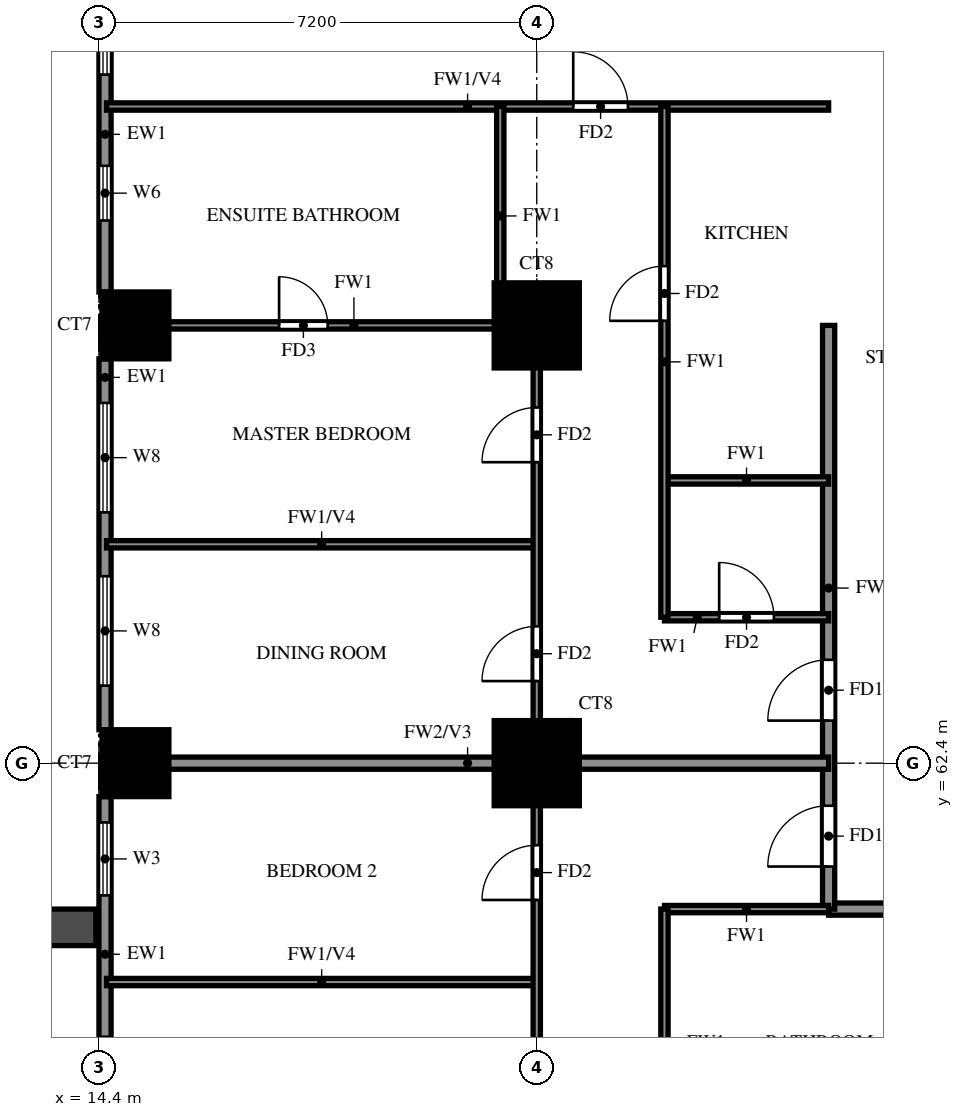
"""IFC4 building model, lengths in metres.
Left out: names, types, materials, properties, quantities, classifications, styles, units other than length and angle.
Written with IfcOpenShell. Run it as: python <this file> out.ifc"""

import sys

from ifc_helpers import new_model, si_unit, direction, frame, frame_2d, origin, origin_2d, place, context, subcontext, project, spatial, rectangle, extrude, source, transform, mapped, element, fill, save


model = new_model("IFC4")
c1 = context("Model", 3, precision=1e-05, world=origin(), true_north=direction((0.0, 1.0)))
c2 = subcontext(c1, "Body", "Model", "MODEL_VIEW")
j1 = project(units=[si_unit("LENGTHUNIT", "METRE"), si_unit("PLANEANGLEUNIT", "RADIAN")], contexts=[c1])
p1 = place(None, origin())
s1 = spatial("IfcSite", under=j1, at=p1, CompositionType="ELEMENT")
p2 = place(p1, origin())
s2 = spatial("IfcBuilding", under=s1, at=p2, CompositionType="ELEMENT")
p3 = place(p2, frame((0.0, 0.0, 30.5)))
s3 = spatial("IfcBuildingStorey", under=s2, at=p3, CompositionType="ELEMENT", Elevation=30.5)
m1 = source(origin(), c2, "Body", "SweptSolid", [
    extrude(rectangle(XDim=1.1, YDim=1.1, at=origin_2d()), origin(), (0.0, 0.0, 1.0), 3.18),
])
p4 = place(p3, frame((15.0, 62.4, 0.0), z_axis=(0.0, 0.0, 1.0), x_axis=(1.0, 0.0, 0.0)))
e1 = element("IfcColumn", 1, at=p4, inside=s3, PredefinedType="COLUMN", context=c2, shape_type="MappedRepresentation", body=[
    mapped(m1, transform((0.0, 0.0, 0.0))),
])
m2 = source(origin(), c2, "Body", "SweptSolid", [
    extrude(rectangle(XDim=1.4, YDim=1.4, at=origin_2d()), origin(), (0.0, 0.0, 1.0), 3.18),
])
p5 = place(p3, frame((21.6, 62.4, 0.0), z_axis=(0.0, 0.0, 1.0), x_axis=(1.0, 0.0, 0.0)))
e2 = element("IfcColumn", 2, at=p5, inside=s3, PredefinedType="COLUMN", context=c2, shape_type="MappedRepresentation", body=[
    mapped(m2, transform((0.0, 0.0, 0.0))),
])
p6 = place(p3, frame((15.0, 69.6, 0.0), z_axis=(0.0, 0.0, 1.0), x_axis=(1.0, 0.0, 0.0)))
e3 = element("IfcColumn", 3, at=p6, inside=s3, PredefinedType="COLUMN", context=c2, shape_type="MappedRepresentation", body=[
    mapped(m1, transform((0.0, 0.0, 0.0))),
])
p7 = place(p3, frame((21.6, 69.6, 0.0), z_axis=(0.0, 0.0, 1.0), x_axis=(1.0, 0.0, 0.0)))
e4 = element("IfcColumn", 4, at=p7, inside=s3, PredefinedType="COLUMN", context=c2, shape_type="MappedRepresentation", body=[
    mapped(m2, transform((0.0, 0.0, 0.0))),
])
p8 = place(p3, frame((14.5, 76.25, 0.0), z_axis=(0.0, 0.0, 1.0), x_axis=(0.0, -1.0, 0.0)))
e5 = element("IfcWall", 5, at=p8, inside=s3, PredefinedType="SOLIDWALL", context=c2, shape_type="SweptSolid", body=[
    extrude(rectangle(XDim=6.1, YDim=0.2, at=frame_2d((3.05, 0.0))), origin(), (0.0, 0.0, 1.0), 3.18),
])
p9 = place(p8, frame((4.025, 0.0, 1.5)))
e6 = element("IfcOpeningElement", 6, at=p9, cuts=e5, PredefinedType="OPENING", context=c2, shape_type="SweptSolid", body=[
    extrude(rectangle(XDim=0.9, YDim=0.9, at=frame_2d((0.45, 0.45))), frame((0.0, 0.11, 0.0), z_axis=(0.0, -1.0, 0.0), x_axis=(1.0, 0.0, 0.0)), (0.0, 0.0, 1.0), 0.22),
])
p10 = place(p8, frame((0.725, 0.0, 0.6)))
e7 = element("IfcOpeningElement", 7, at=p10, cuts=e5, PredefinedType="OPENING", context=c2, shape_type="SweptSolid", body=[
    extrude(rectangle(XDim=1.8, YDim=2.4, at=frame_2d((0.9, 1.2))), frame((0.0, 0.11, 0.0), z_axis=(0.0, -1.0, 0.0), x_axis=(1.0, 0.0, 0.0)), (0.0, 0.0, 1.0), 0.22),
])
p11 = place(p3, frame((14.5, 69.05, 0.0), z_axis=(0.0, 0.0, 1.0), x_axis=(0.0, -1.0, 0.0)))
e8 = element("IfcWall", 8, at=p11, inside=s3, PredefinedType="SOLIDWALL", context=c2, shape_type="SweptSolid", body=[
    extrude(rectangle(XDim=6.1, YDim=0.2, at=frame_2d((3.05, 0.0))), origin(), (0.0, 0.0, 1.0), 3.18),
])
p12 = place(p11, frame((3.575, 0.0, 0.6)))
e9 = element("IfcOpeningElement", 9, at=p12, cuts=e8, PredefinedType="OPENING", context=c2, shape_type="SweptSolid", body=[
    extrude(rectangle(XDim=1.8, YDim=2.4, at=frame_2d((0.9, 1.2))), frame((0.0, 0.11, 0.0), z_axis=(0.0, -1.0, 0.0), x_axis=(1.0, 0.0, 0.0)), (0.0, 0.0, 1.0), 0.22),
])
p13 = place(p11, frame((0.725, 0.0, 0.6)))
e10 = element("IfcOpeningElement", 10, at=p13, cuts=e8, PredefinedType="OPENING", context=c2, shape_type="SweptSolid", body=[
    extrude(rectangle(XDim=1.8, YDim=2.4, at=frame_2d((0.9, 1.2))), frame((0.0, 0.11, 0.0), z_axis=(0.0, -1.0, 0.0), x_axis=(1.0, 0.0, 0.0)), (0.0, 0.0, 1.0), 0.22),
])
p14 = place(p3, frame((14.5, 61.85, 0.0), z_axis=(0.0, 0.0, 1.0), x_axis=(0.0, -1.0, 0.0)))
e11 = element("IfcWall", 11, at=p14, inside=s3, PredefinedType="SOLIDWALL", context=c2, shape_type="SweptSolid", body=[
    extrude(rectangle(XDim=6.1, YDim=0.2, at=frame_2d((3.05, 0.0))), origin(), (0.0, 0.0, 1.0), 3.18),
])
p15 = place(p14, frame((3.95, 0.0, 0.0)))
e12 = element("IfcOpeningElement", 12, at=p15, cuts=e11, PredefinedType="OPENING", context=c2, shape_type="SweptSolid", body=[
    extrude(rectangle(XDim=1.8, YDim=2.4, at=frame_2d((0.9, 1.2))), frame((0.0, 0.11, 0.0), z_axis=(0.0, -1.0, 0.0), x_axis=(1.0, 0.0, 0.0)), (0.0, 0.0, 1.0), 0.22),
])
p16 = place(p14, frame((0.425, 0.0, 0.6)))
e13 = element("IfcOpeningElement", 13, at=p16, cuts=e11, PredefinedType="OPENING", context=c2, shape_type="SweptSolid", body=[
    extrude(rectangle(XDim=1.2, YDim=2.4, at=frame_2d((0.6, 1.2))), frame((0.0, 0.11, 0.0), z_axis=(0.0, -1.0, 0.0), x_axis=(1.0, 0.0, 0.0)), (0.0, 0.0, 1.0), 0.22),
])
p17 = place(p3, frame((14.35, 59.7, 0.0), z_axis=(0.0, 0.0, 1.0), x_axis=(-1.0, 0.0, 0.0)))
e14 = element("IfcWall", 14, at=p17, inside=s3, PredefinedType="SOLIDWALL", context=c2, shape_type="SweptSolid", body=[
    extrude(rectangle(XDim=2.65, YDim=0.6, at=frame_2d((1.325, 0.0))), origin(), (0.0, 0.0, 1.0), 2.85),
])
p18 = place(p3, frame((26.4, 60.0, 0.0), z_axis=(0.0, 0.0, 1.0), x_axis=(1.0, 0.0, 0.0)))
e15 = element("IfcWall", 15, at=p18, inside=s3, PredefinedType="SOLIDWALL", context=c2, shape_type="SweptSolid", body=[
    extrude(rectangle(XDim=7.2, YDim=0.2, at=frame_2d((3.6, 0.0))), origin(), (0.0, 0.0, 1.0), 3.18),
])
p19 = place(p3, frame((26.4, 60.0, 0.0), z_axis=(0.0, 0.0, 1.0), x_axis=(0.0, 1.0, 0.0)))
e16 = element("IfcWall", 16, at=p19, inside=s3, PredefinedType="SOLIDWALL", context=c2, shape_type="SweptSolid", body=[
    extrude(rectangle(XDim=9.6, YDim=0.2, at=frame_2d((4.8, 0.0))), origin(), (0.0, 0.0, 1.0), 3.18),
])
p20 = place(p19, frame((0.7, 0.0, 0.0)))
e17 = element("IfcOpeningElement", 17, at=p20, cuts=e16, PredefinedType="OPENING", context=c2, shape_type="SweptSolid", body=[
    extrude(rectangle(XDim=1.0, YDim=2.1, at=frame_2d((0.5, 1.05))), frame((0.0, 0.11, 0.0), z_axis=(0.0, -1.0, 0.0), x_axis=(1.0, 0.0, 0.0)), (0.0, 0.0, 1.0), 0.22),
])
p21 = place(p19, frame((3.1, 0.0, 0.0)))
e18 = element("IfcOpeningElement", 18, at=p21, cuts=e16, PredefinedType="OPENING", context=c2, shape_type="SweptSolid", body=[
    extrude(rectangle(XDim=1.0, YDim=2.1, at=frame_2d((0.5, 1.05))), frame((0.0, 0.11, 0.0), z_axis=(0.0, -1.0, 0.0), x_axis=(1.0, 0.0, 0.0)), (0.0, 0.0, 1.0), 0.22),
])
p22 = place(p3, frame((14.525, 62.4, 0.0), z_axis=(0.0, 0.0, 1.0), x_axis=(1.0, 0.0, 0.0)))
e19 = element("IfcWall", 19, at=p22, inside=s3, PredefinedType="SOLIDWALL", context=c2, shape_type="SweptSolid", body=[
    extrude(rectangle(XDim=11.875, YDim=0.2, at=frame_2d((5.938, 0.0))), origin(), (0.0, 0.0, 1.0), 3.18),
])
p23 = place(p3, frame((14.525, 58.8, 0.0), z_axis=(0.0, 0.0, 1.0), x_axis=(1.0, 0.0, 0.0)))
e20 = element("IfcWall", 20, at=p23, inside=s3, PredefinedType="PARTITIONING", context=c2, shape_type="SweptSolid", body=[
    extrude(rectangle(XDim=7.075, YDim=0.12, at=frame_2d((3.538, 0.0))), origin(), (0.0, 0.0, 1.0), 2.28),
])
p24 = place(p3, frame((23.7, 60.0, 0.0), z_axis=(0.0, 0.0, 1.0), x_axis=(1.0, 0.0, 0.0)))
e21 = element("IfcWall", 21, at=p24, inside=s3, PredefinedType="PARTITIONING", context=c2, shape_type="SweptSolid", body=[
    extrude(rectangle(XDim=2.7, YDim=0.12, at=frame_2d((1.35, 0.0))), origin(), (0.0, 0.0, 1.0), 3.18),
])
p25 = place(p3, frame((23.7, 64.8, 0.0), z_axis=(0.0, 0.0, 1.0), x_axis=(1.0, 0.0, 0.0)))
e22 = element("IfcWall", 22, at=p25, inside=s3, PredefinedType="PARTITIONING", context=c2, shape_type="SweptSolid", body=[
    extrude(rectangle(XDim=2.7, YDim=0.12, at=frame_2d((1.35, 0.0))), origin(), (0.0, 0.0, 1.0), 3.18),
])
p26 = place(p25, frame((0.9, 0.0, 0.0)))
e23 = element("IfcOpeningElement", 23, at=p26, cuts=e22, PredefinedType="OPENING", context=c2, shape_type="SweptSolid", body=[
    extrude(rectangle(XDim=0.9, YDim=2.1, at=frame_2d((0.45, 1.05))), frame((0.0, 0.07, 0.0), z_axis=(0.0, -1.0, 0.0), x_axis=(1.0, 0.0, 0.0)), (0.0, 0.0, 1.0), 0.14),
])
p27 = place(p3, frame((14.525, 66.0, 0.0), z_axis=(0.0, 0.0, 1.0), x_axis=(1.0, 0.0, 0.0)))
e24 = element("IfcWall", 24, at=p27, inside=s3, PredefinedType="PARTITIONING", context=c2, shape_type="SweptSolid", body=[
    extrude(rectangle(XDim=7.075, YDim=0.12, at=frame_2d((3.538, 0.0))), origin(), (0.0, 0.0, 1.0), 2.28),
])
p28 = place(p3, frame((23.7, 67.05, 0.0), z_axis=(0.0, 0.0, 1.0), x_axis=(1.0, 0.0, 0.0)))
e25 = element("IfcWall", 25, at=p28, inside=s3, PredefinedType="PARTITIONING", context=c2, shape_type="SweptSolid", body=[
    extrude(rectangle(XDim=2.7, YDim=0.12, at=frame_2d((1.35, 0.0))), origin(), (0.0, 0.0, 1.0), 3.18),
])
p29 = place(p3, frame((14.525, 69.6, 0.0), z_axis=(0.0, 0.0, 1.0), x_axis=(1.0, 0.0, 0.0)))
e26 = element("IfcWall", 26, at=p29, inside=s3, PredefinedType="PARTITIONING", context=c2, shape_type="SweptSolid", body=[
    extrude(rectangle(XDim=7.075, YDim=0.12, at=frame_2d((3.538, 0.0))), origin(), (0.0, 0.0, 1.0), 3.18),
])
p30 = place(p29, frame((2.837, 0.0, 0.0)))
e27 = element("IfcOpeningElement", 27, at=p30, cuts=e26, PredefinedType="OPENING", context=c2, shape_type="SweptSolid", body=[
    extrude(rectangle(XDim=0.8, YDim=2.1, at=frame_2d((0.4, 1.05))), frame((0.0, 0.07, 0.0), z_axis=(0.0, -1.0, 0.0), x_axis=(1.0, 0.0, 0.0)), (0.0, 0.0, 1.0), 0.14),
])
p31 = place(p3, frame((14.525, 73.2, 0.0), z_axis=(0.0, 0.0, 1.0), x_axis=(1.0, 0.0, 0.0)))
e28 = element("IfcWall", 28, at=p31, inside=s3, PredefinedType="PARTITIONING", context=c2, shape_type="SweptSolid", body=[
    extrude(rectangle(XDim=11.875, YDim=0.12, at=frame_2d((5.938, 0.0))), origin(), (0.0, 0.0, 1.0), 2.28),
])
p32 = place(p31, frame((7.675, 0.0, 0.0)))
e29 = element("IfcOpeningElement", 29, at=p32, cuts=e28, PredefinedType="OPENING", context=c2, shape_type="SweptSolid", body=[
    extrude(rectangle(XDim=0.9, YDim=2.1, at=frame_2d((0.45, 1.05))), frame((0.0, 0.07, 0.0), z_axis=(0.0, -1.0, 0.0), x_axis=(1.0, 0.0, 0.0)), (0.0, 0.0, 1.0), 0.14),
])
p33 = place(p3, frame((21.0, 69.6, 0.0), z_axis=(0.0, 0.0, 1.0), x_axis=(0.0, 1.0, 0.0)))
e30 = element("IfcWall", 30, at=p33, inside=s3, PredefinedType="PARTITIONING", context=c2, shape_type="SweptSolid", body=[
    extrude(rectangle(XDim=3.6, YDim=0.12, at=frame_2d((1.8, 0.0))), origin(), (0.0, 0.0, 1.0), 3.18),
])
p34 = place(p3, frame((21.6, 33.725, 0.0), z_axis=(0.0, 0.0, 1.0), x_axis=(0.0, 1.0, 0.0)))
e31 = element("IfcWall", 31, at=p34, inside=s3, PredefinedType="PARTITIONING", context=c2, shape_type="SweptSolid", body=[
    extrude(rectangle(XDim=35.875, YDim=0.12, at=frame_2d((17.938, 0.0))), origin(), (0.0, 0.0, 1.0), 3.18),
])
p35 = place(p34, frame((7.775, 0.0, 0.0)))
e32 = element("IfcOpeningElement", 32, at=p35, cuts=e31, PredefinedType="OPENING", context=c2, shape_type="SweptSolid", body=[
    extrude(rectangle(XDim=0.9, YDim=2.1, at=frame_2d((0.45, 1.05))), frame((0.0, 0.07, 0.0), z_axis=(0.0, -1.0, 0.0), x_axis=(1.0, 0.0, 0.0)), (0.0, 0.0, 1.0), 0.14),
])
p36 = place(p34, frame((15.625, 0.0, 0.0)))
e33 = element("IfcOpeningElement", 33, at=p36, cuts=e31, PredefinedType="OPENING", context=c2, shape_type="SweptSolid", body=[
    extrude(rectangle(XDim=0.9, YDim=2.1, at=frame_2d((0.45, 1.05))), frame((0.0, 0.07, 0.0), z_axis=(0.0, -1.0, 0.0), x_axis=(1.0, 0.0, 0.0)), (0.0, 0.0, 1.0), 0.14),
])
p37 = place(p34, frame((22.225, 0.0, 0.0)))
e34 = element("IfcOpeningElement", 34, at=p37, cuts=e31, PredefinedType="OPENING", context=c2, shape_type="SweptSolid", body=[
    extrude(rectangle(XDim=1.5, YDim=2.1, at=frame_2d((0.75, 1.05))), frame((0.0, 0.07, 0.0), z_axis=(0.0, -1.0, 0.0), x_axis=(1.0, 0.0, 0.0)), (0.0, 0.0, 1.0), 0.14),
])
p38 = place(p34, frame((26.425, 0.0, 0.0)))
e35 = element("IfcOpeningElement", 35, at=p38, cuts=e31, PredefinedType="OPENING", context=c2, shape_type="SweptSolid", body=[
    extrude(rectangle(XDim=0.9, YDim=2.1, at=frame_2d((0.45, 1.05))), frame((0.0, 0.07, 0.0), z_axis=(0.0, -1.0, 0.0), x_axis=(1.0, 0.0, 0.0)), (0.0, 0.0, 1.0), 0.14),
])
p39 = place(p34, frame((30.025, 0.0, 0.0)))
e36 = element("IfcOpeningElement", 36, at=p39, cuts=e31, PredefinedType="OPENING", context=c2, shape_type="SweptSolid", body=[
    extrude(rectangle(XDim=0.9, YDim=2.1, at=frame_2d((0.45, 1.05))), frame((0.0, 0.07, 0.0), z_axis=(0.0, -1.0, 0.0), x_axis=(1.0, 0.0, 0.0)), (0.0, 0.0, 1.0), 0.14),
])
p40 = place(p34, frame((33.625, 0.0, 0.0)))
e37 = element("IfcOpeningElement", 37, at=p40, cuts=e31, PredefinedType="OPENING", context=c2, shape_type="SweptSolid", body=[
    extrude(rectangle(XDim=0.9, YDim=2.1, at=frame_2d((0.45, 1.05))), frame((0.0, 0.07, 0.0), z_axis=(0.0, -1.0, 0.0), x_axis=(1.0, 0.0, 0.0)), (0.0, 0.0, 1.0), 0.14),
])
p41 = place(p3, frame((23.7, 55.6, 0.0), z_axis=(0.0, 0.0, 1.0), x_axis=(0.0, 1.0, 0.0)))
e38 = element("IfcWall", 38, at=p41, inside=s3, PredefinedType="PARTITIONING", context=c2, shape_type="SweptSolid", body=[
    extrude(rectangle(XDim=4.4, YDim=0.12, at=frame_2d((2.2, 0.0))), origin(), (0.0, 0.0, 1.0), 3.18),
])
p42 = place(p3, frame((23.7, 64.8, 0.0), z_axis=(0.0, 0.0, 1.0), x_axis=(0.0, 1.0, 0.0)))
e39 = element("IfcWall", 39, at=p42, inside=s3, PredefinedType="PARTITIONING", context=c2, shape_type="SweptSolid", body=[
    extrude(rectangle(XDim=8.4, YDim=0.12, at=frame_2d((4.2, 0.0))), origin(), (0.0, 0.0, 1.0), 3.18),
])
p43 = place(p42, frame((4.875, 0.0, 0.0)))
e40 = element("IfcOpeningElement", 40, at=p43, cuts=e39, PredefinedType="OPENING", context=c2, shape_type="SweptSolid", body=[
    extrude(rectangle(XDim=0.9, YDim=2.1, at=frame_2d((0.45, 1.05))), frame((0.0, 0.07, 0.0), z_axis=(0.0, -1.0, 0.0), x_axis=(1.0, 0.0, 0.0)), (0.0, 0.0, 1.0), 0.14),
])
p44 = place(p9, origin())
e41 = element("IfcWindow", 41, at=p44, inside=s3, PartitioningType="SINGLE_PANEL", PredefinedType="WINDOW", context=c2, shape_type="SweptSolid", body=[
    extrude(rectangle(XDim=0.9, YDim=0.9, at=frame_2d((0.45, 0.45))), frame((0.0, 0.03, 0.0), z_axis=(0.0, -1.0, 0.0), x_axis=(1.0, 0.0, 0.0)), (0.0, 0.0, 1.0), 0.06),
])
fill(e6, e41)
p45 = place(p10, origin())
e42 = element("IfcWindow", 42, at=p45, inside=s3, PartitioningType="DOUBLE_PANEL_VERTICAL", PredefinedType="WINDOW", context=c2, shape_type="SweptSolid", body=[
    extrude(rectangle(XDim=1.8, YDim=2.4, at=frame_2d((0.9, 1.2))), frame((0.0, 0.03, 0.0), z_axis=(0.0, -1.0, 0.0), x_axis=(1.0, 0.0, 0.0)), (0.0, 0.0, 1.0), 0.06),
])
fill(e7, e42)
p46 = place(p12, origin())
e43 = element("IfcWindow", 43, at=p46, inside=s3, PartitioningType="DOUBLE_PANEL_VERTICAL", PredefinedType="WINDOW", context=c2, shape_type="SweptSolid", body=[
    extrude(rectangle(XDim=1.8, YDim=2.4, at=frame_2d((0.9, 1.2))), frame((0.0, 0.03, 0.0), z_axis=(0.0, -1.0, 0.0), x_axis=(1.0, 0.0, 0.0)), (0.0, 0.0, 1.0), 0.06),
])
fill(e9, e43)
p47 = place(p13, origin())
e44 = element("IfcWindow", 44, at=p47, inside=s3, PartitioningType="DOUBLE_PANEL_VERTICAL", PredefinedType="WINDOW", context=c2, shape_type="SweptSolid", body=[
    extrude(rectangle(XDim=1.8, YDim=2.4, at=frame_2d((0.9, 1.2))), frame((0.0, 0.03, 0.0), z_axis=(0.0, -1.0, 0.0), x_axis=(1.0, 0.0, 0.0)), (0.0, 0.0, 1.0), 0.06),
])
fill(e10, e44)
p48 = place(p15, origin())
e45 = element("IfcDoor", 45, at=p48, inside=s3, OperationType="DOUBLE_DOOR_SLIDING", PredefinedType="DOOR", context=c2, shape_type="SweptSolid", body=[
    extrude(rectangle(XDim=1.8, YDim=2.4, at=frame_2d((0.9, 1.2))), frame((0.0, 0.025, 0.0), z_axis=(0.0, -1.0, 0.0), x_axis=(1.0, 0.0, 0.0)), (0.0, 0.0, 1.0), 0.05),
])
fill(e12, e45)
p49 = place(p16, origin())
e46 = element("IfcWindow", 46, at=p49, inside=s3, PartitioningType="SINGLE_PANEL", PredefinedType="WINDOW", context=c2, shape_type="SweptSolid", body=[
    extrude(rectangle(XDim=1.2, YDim=2.4, at=frame_2d((0.6, 1.2))), frame((0.0, 0.03, 0.0), z_axis=(0.0, -1.0, 0.0), x_axis=(1.0, 0.0, 0.0)), (0.0, 0.0, 1.0), 0.06),
])
fill(e13, e46)
p50 = place(p20, origin())
e47 = element("IfcDoor", 47, at=p50, inside=s3, OperationType="SINGLE_SWING_LEFT", PredefinedType="DOOR", context=c2, shape_type="SweptSolid", body=[
    extrude(rectangle(XDim=1.0, YDim=2.1, at=frame_2d((0.5, 1.05))), frame((0.0, 0.025, 0.0), z_axis=(0.0, -1.0, 0.0), x_axis=(1.0, 0.0, 0.0)), (0.0, 0.0, 1.0), 0.05),
])
fill(e17, e47)
p51 = place(p38, origin())
e48 = element("IfcDoor", 48, at=p51, inside=s3, OperationType="SINGLE_SWING_LEFT", PredefinedType="DOOR", context=c2, shape_type="SweptSolid", body=[
    extrude(rectangle(XDim=0.9, YDim=2.1, at=frame_2d((0.45, 1.05))), frame((0.0, 0.025, 0.0), z_axis=(0.0, -1.0, 0.0), x_axis=(1.0, 0.0, 0.0)), (0.0, 0.0, 1.0), 0.05),
])
fill(e35, e48)
p52 = place(p21, origin())
e49 = element("IfcDoor", 49, at=p52, inside=s3, OperationType="SINGLE_SWING_RIGHT", PredefinedType="DOOR", context=c2, shape_type="SweptSolid", body=[
    extrude(rectangle(XDim=1.0, YDim=2.1, at=frame_2d((0.5, 1.05))), frame((0.0, 0.025, 0.0), z_axis=(0.0, -1.0, 0.0), x_axis=(1.0, 0.0, 0.0)), (0.0, 0.0, 1.0), 0.05),
])
fill(e18, e49)
p53 = place(p39, origin())
e50 = element("IfcDoor", 50, at=p53, inside=s3, OperationType="SINGLE_SWING_LEFT", PredefinedType="DOOR", context=c2, shape_type="SweptSolid", body=[
    extrude(rectangle(XDim=0.9, YDim=2.1, at=frame_2d((0.45, 1.05))), frame((0.0, 0.025, 0.0), z_axis=(0.0, -1.0, 0.0), x_axis=(1.0, 0.0, 0.0)), (0.0, 0.0, 1.0), 0.05),
])
fill(e36, e50)
p54 = place(p40, origin())
e51 = element("IfcDoor", 51, at=p54, inside=s3, OperationType="SINGLE_SWING_LEFT", PredefinedType="DOOR", context=c2, shape_type="SweptSolid", body=[
    extrude(rectangle(XDim=0.9, YDim=2.1, at=frame_2d((0.45, 1.05))), frame((0.0, 0.025, 0.0), z_axis=(0.0, -1.0, 0.0), x_axis=(1.0, 0.0, 0.0)), (0.0, 0.0, 1.0), 0.05),
])
fill(e37, e51)
p55 = place(p30, origin())
e52 = element("IfcDoor", 52, at=p55, inside=s3, OperationType="SINGLE_SWING_RIGHT", PredefinedType="DOOR", context=c2, shape_type="SweptSolid", body=[
    extrude(rectangle(XDim=0.8, YDim=2.1, at=frame_2d((0.4, 1.05))), frame((0.0, 0.025, 0.0), z_axis=(0.0, -1.0, 0.0), x_axis=(1.0, 0.0, 0.0)), (0.0, 0.0, 1.0), 0.05),
])
fill(e27, e52)
p56 = place(p32, origin())
e53 = element("IfcDoor", 53, at=p56, inside=s3, OperationType="SINGLE_SWING_LEFT", PredefinedType="DOOR", context=c2, shape_type="SweptSolid", body=[
    extrude(rectangle(XDim=0.9, YDim=2.1, at=frame_2d((0.45, 1.05))), frame((0.0, 0.025, 0.0), z_axis=(0.0, -1.0, 0.0), x_axis=(1.0, 0.0, 0.0)), (0.0, 0.0, 1.0), 0.05),
])
fill(e29, e53)
p57 = place(p26, origin())
e54 = element("IfcDoor", 54, at=p57, inside=s3, OperationType="SINGLE_SWING_LEFT", PredefinedType="DOOR", context=c2, shape_type="SweptSolid", body=[
    extrude(rectangle(XDim=0.9, YDim=2.1, at=frame_2d((0.45, 1.05))), frame((0.0, 0.025, 0.0), z_axis=(0.0, -1.0, 0.0), x_axis=(1.0, 0.0, 0.0)), (0.0, 0.0, 1.0), 0.05),
])
fill(e23, e54)
p58 = place(p43, origin())
e55 = element("IfcDoor", 55, at=p58, inside=s3, OperationType="SINGLE_SWING_RIGHT", PredefinedType="DOOR", context=c2, shape_type="SweptSolid", body=[
    extrude(rectangle(XDim=0.9, YDim=2.1, at=frame_2d((0.45, 1.05))), frame((0.0, 0.025, 0.0), z_axis=(0.0, -1.0, 0.0), x_axis=(1.0, 0.0, 0.0)), (0.0, 0.0, 1.0), 0.05),
])
fill(e40, e55)
save(model, sys.argv[1])
